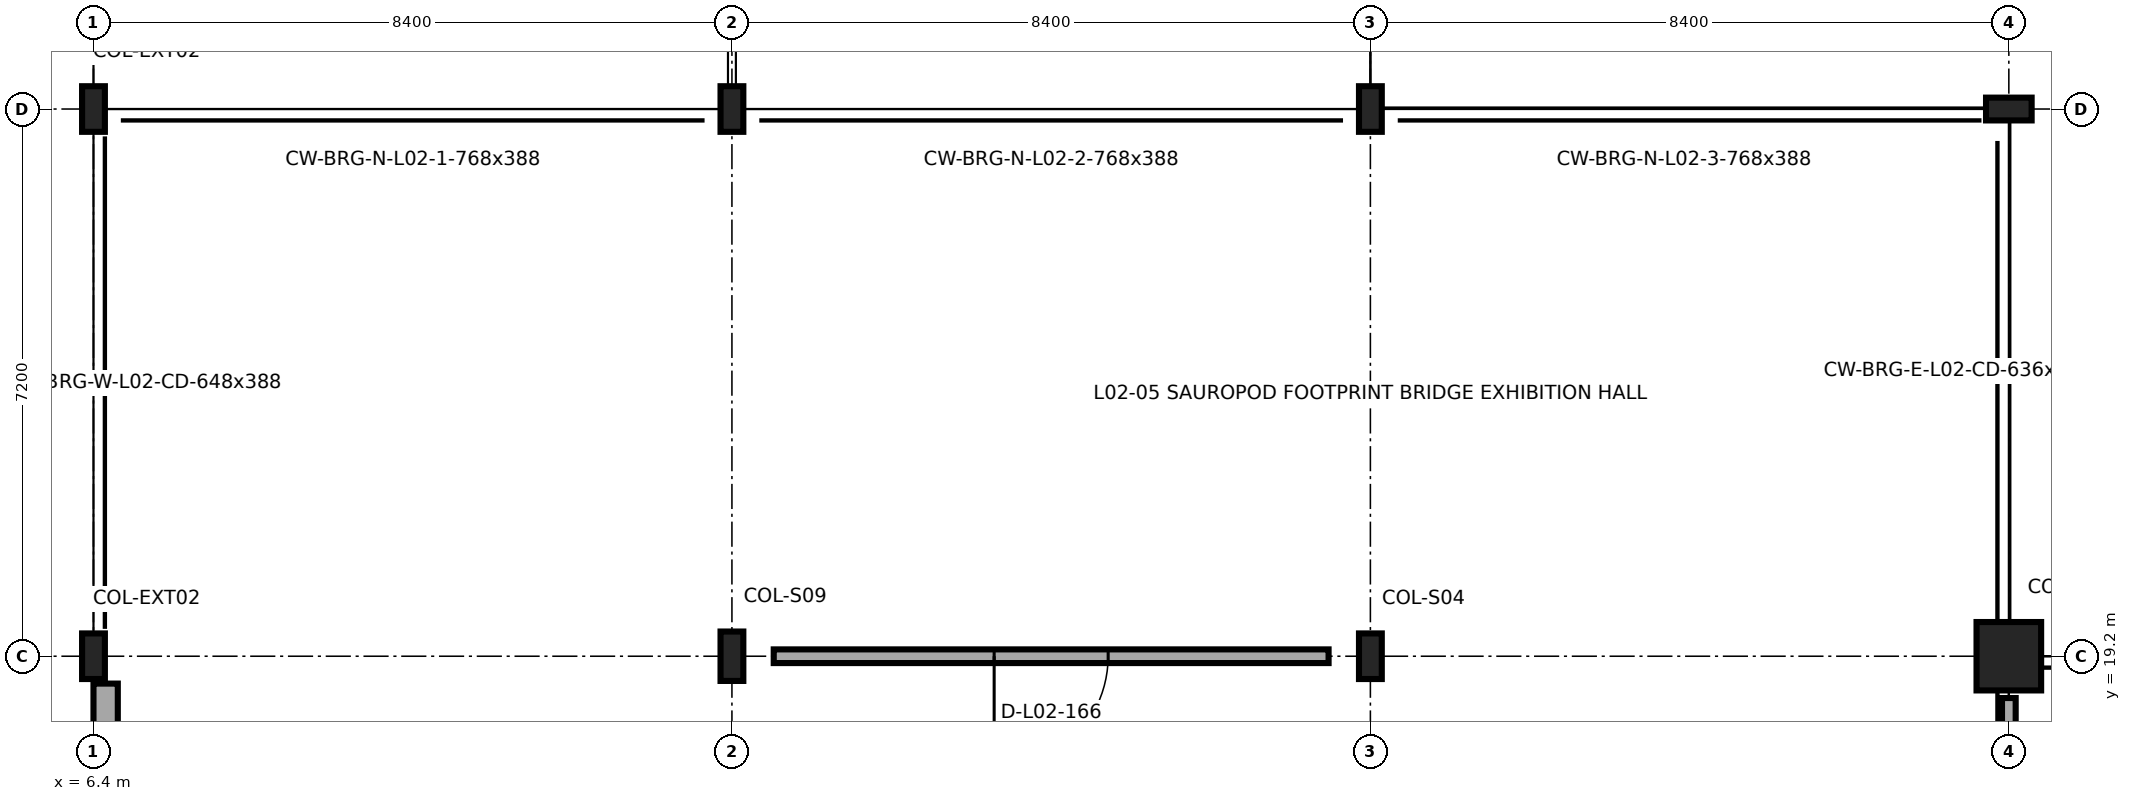
"""IFC4 building model, lengths in metres.
Left out: names, types, materials, properties, quantities, classifications, styles, units other than length and angle.
Written with IfcOpenShell. Run it as: python <this file> out.ifc"""

import sys

from ifc_helpers import new_model, si_unit, direction, frame, frame_2d, origin, origin_2d, place, context, subcontext, project, spatial, rectangle, i_section, extrude, element, fill, save


model = new_model("IFC4")
c1 = context("Model", 3, precision=1e-05, world=origin(), true_north=direction((0.0, 1.0)))
c2 = subcontext(c1, "Body", "Model", "MODEL_VIEW")
j1 = project(units=[si_unit("LENGTHUNIT", "METRE"), si_unit("PLANEANGLEUNIT", "RADIAN")], contexts=[c1])
p1 = place(None, origin())
s1 = spatial("IfcSite", under=j1, at=p1, CompositionType="ELEMENT")
p2 = place(p1, origin())
s2 = spatial("IfcBuilding", under=s1, at=p2, CompositionType="ELEMENT")
p3 = place(p2, frame((0.0, 0.0, 12.9)))
s3 = spatial("IfcBuildingStorey", under=s2, at=p3, CompositionType="ELEMENT", Elevation=12.9)
for number, where, z_axis, x_axis in (
    (1, (6.4, 19.2, 0.0), (0.0, 0.0, 1.0), (1.0, 0.0, 0.0)),
    (2, (6.4, 26.4, 0.0), (0.0, 0.0, 1.0), (1.0, 0.0, 0.0)),
):
    element("IfcColumn", number, at=place(p3, frame(where, z_axis=z_axis, x_axis=x_axis)), inside=s3, PredefinedType="COLUMN", context=c2, shape_type="SweptSolid", body=[
        extrude(i_section(OverallWidth=0.3, OverallDepth=0.6, WebThickness=0.015, FlangeThickness=0.03, FilletRadius=0.027, at=origin_2d()), origin(), (0.0, 0.0, 1.0), 4.5),
    ])
p4 = place(p3, frame((14.8, 19.2, 0.0), z_axis=(0.0, 0.0, 1.0), x_axis=(1.0, 0.0, 0.0)))
e3 = element("IfcColumn", 3, at=p4, inside=s3, PredefinedType="COLUMN", context=c2, shape_type="SweptSolid", body=[
    extrude(i_section(OverallWidth=0.3, OverallDepth=0.65, WebThickness=0.016, FlangeThickness=0.031, FilletRadius=0.027, at=origin_2d()), origin(), (0.0, 0.0, 1.0), 4.5),
])
for number, where, z_axis, x_axis in (
    (4, (14.8, 26.4, 0.0), (0.0, 0.0, 1.0), (1.0, 0.0, 0.0)),
    (5, (23.2, 19.2, 0.0), (0.0, 0.0, 1.0), (1.0, 0.0, 0.0)),
    (6, (23.2, 26.4, 0.0), (0.0, 0.0, 1.0), (1.0, 0.0, 0.0)),
):
    element("IfcColumn", number, at=place(p3, frame(where, z_axis=z_axis, x_axis=x_axis)), inside=s3, PredefinedType="COLUMN", context=c2, shape_type="SweptSolid", body=[
        extrude(i_section(OverallWidth=0.3, OverallDepth=0.6, WebThickness=0.015, FlangeThickness=0.03, FilletRadius=0.027, at=origin_2d()), origin(), (0.0, 0.0, 1.0), 4.5),
    ])
p5 = place(p3, frame((31.6, 19.2, 0.0), z_axis=(0.0, 0.0, 1.0), x_axis=(1.0, 0.0, 0.0)))
e7 = element("IfcColumn", 7, at=p5, inside=s3, PredefinedType="COLUMN", context=c2, shape_type="SweptSolid", body=[
    extrude(rectangle(XDim=0.85, YDim=0.9, at=origin_2d()), origin(), (0.0, 0.0, 1.0), 4.5),
])
p6 = place(p3, frame((31.6, 26.4, 0.0), z_axis=(0.0, 0.0, 1.0), x_axis=(0.0, 1.0, 0.0)))
e8 = element("IfcColumn", 8, at=p6, inside=s3, PredefinedType="COLUMN", context=c2, shape_type="SweptSolid", body=[
    extrude(i_section(OverallWidth=0.3, OverallDepth=0.6, WebThickness=0.015, FlangeThickness=0.03, FilletRadius=0.027, at=origin_2d()), origin(), (0.0, 0.0, 1.0), 4.5),
])
p7 = place(p3, frame((6.56, 18.84, 0.0), z_axis=(0.0, 0.0, 1.0), x_axis=(0.0, -1.0, 0.0)))
e9 = element("IfcWall", 9, at=p7, inside=s3, PredefinedType="SOLIDWALL", context=c2, shape_type="SweptSolid", body=[
    extrude(rectangle(XDim=0.84, YDim=0.32, at=frame_2d((0.42, 0.0))), origin(), (0.0, 0.0, 1.0), 2.622),
])
p8 = place(p3, frame((31.6, 10.15, 0.0), z_axis=(0.0, 0.0, 1.0), x_axis=(0.0, 1.0, 0.0)))
e10 = element("IfcWall", 10, at=p8, inside=s3, PredefinedType="PARTITIONING", context=c2, shape_type="SweptSolid", body=[
    extrude(rectangle(XDim=8.5, YDim=0.18, at=frame_2d((4.25, 0.0))), origin(), (0.0, 0.0, 1.0), 3.532),
])
p9 = place(p8, frame((3.35, 0.0, 0.0)))
e11 = element("IfcOpeningElement", 11, at=p9, cuts=e10, PredefinedType="OPENING", context=c2, shape_type="SweptSolid", body=[
    extrude(rectangle(XDim=1.8, YDim=2.2, at=frame_2d((0.9, 1.1))), frame((0.0, 0.1, 0.0), z_axis=(0.0, -1.0, 0.0), x_axis=(1.0, 0.0, 0.0)), (0.0, 0.0, 1.0), 0.2),
])
p10 = place(p3, frame((15.35, 19.2, 0.0), z_axis=(0.0, 0.0, 1.0), x_axis=(1.0, 0.0, 0.0)))
e12 = element("IfcWall", 12, at=p10, inside=s3, PredefinedType="PARTITIONING", context=c2, shape_type="SweptSolid", body=[
    extrude(rectangle(XDim=7.3, YDim=0.18, at=frame_2d((3.65, 0.0))), origin(), (0.0, 0.0, 1.0), 3.642),
])
p11 = place(p10, frame((2.9, 0.0, 0.0)))
e13 = element("IfcOpeningElement", 13, at=p11, cuts=e12, PredefinedType="OPENING", context=c2, shape_type="SweptSolid", body=[
    extrude(rectangle(XDim=1.5, YDim=2.3, at=frame_2d((0.75, 1.15))), frame((0.0, 0.1, 0.0), z_axis=(0.0, -1.0, 0.0), x_axis=(1.0, 0.0, 0.0)), (0.0, 0.0, 1.0), 0.2),
])
p12 = place(p11, origin())
e14 = element("IfcDoor", 14, at=p12, inside=s3, OperationType="SINGLE_SWING_RIGHT", PredefinedType="DOOR", context=c2, shape_type="SweptSolid", body=[
    extrude(rectangle(XDim=1.5, YDim=2.3, at=frame_2d((0.75, 1.15))), frame((0.0, 0.025, 0.0), z_axis=(0.0, -1.0, 0.0), x_axis=(1.0, 0.0, 0.0)), (0.0, 0.0, 1.0), 0.05),
])
fill(e13, e14)
save(model, sys.argv[1])
